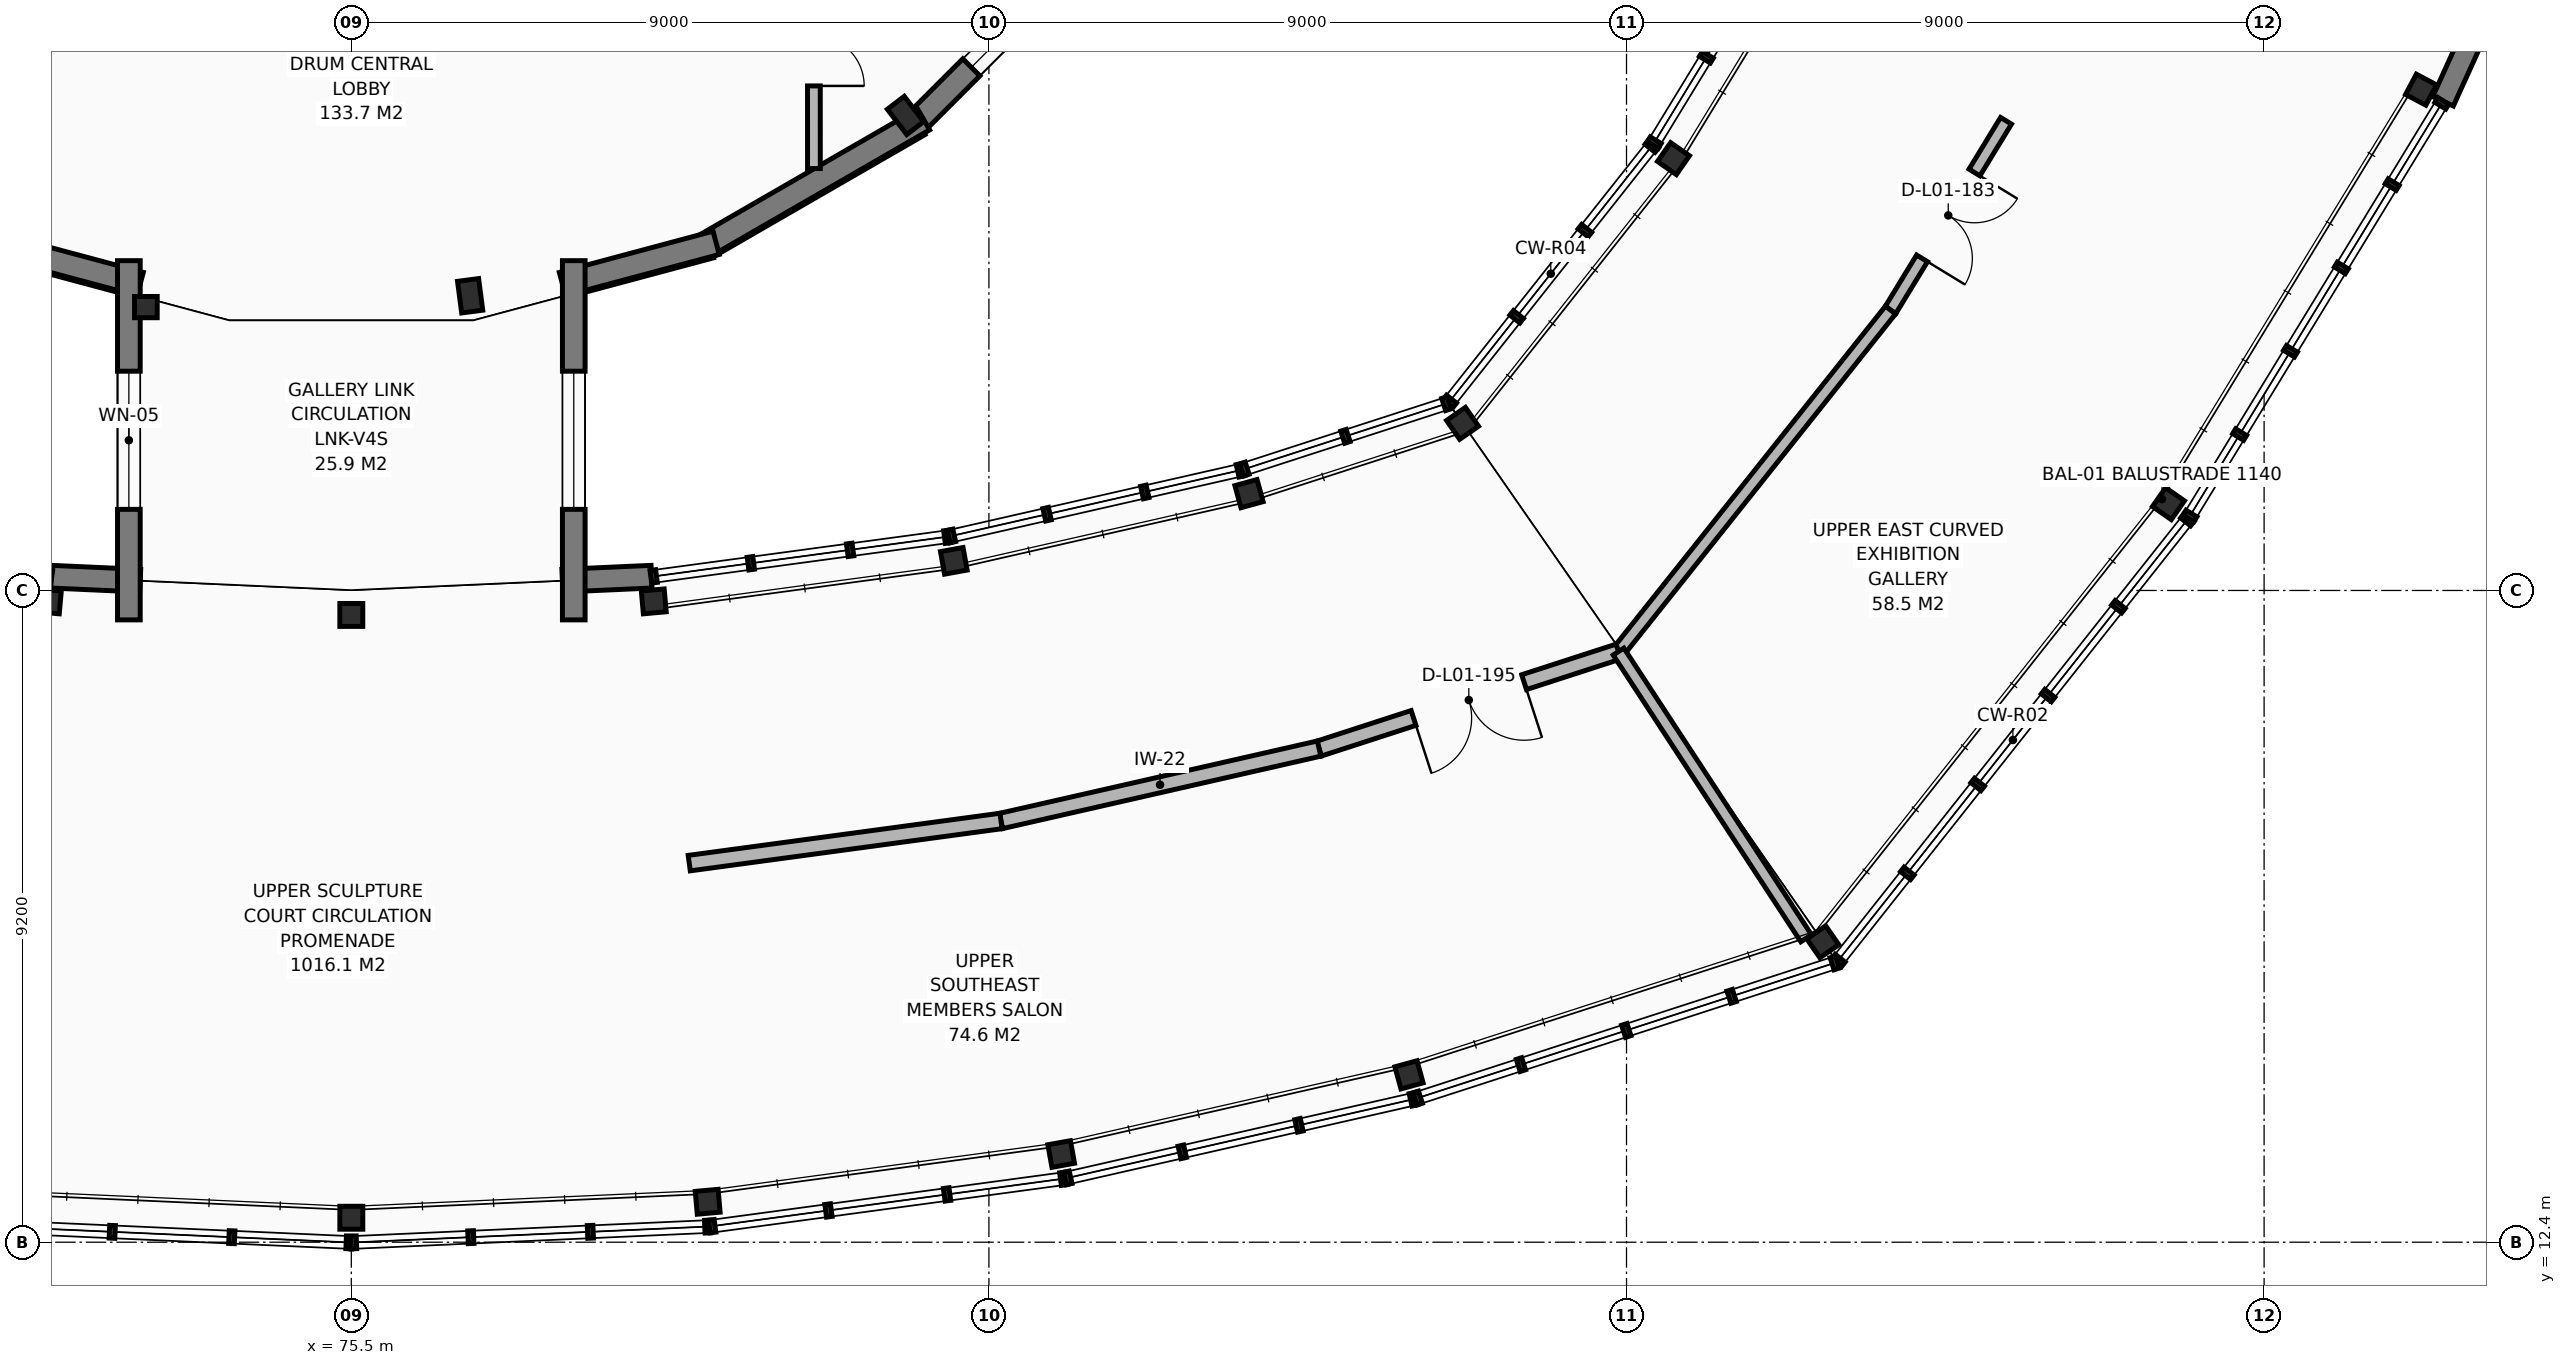
"""IFC4 building model, lengths in metres.
Left out: names, types, materials, properties, quantities, classifications, styles, units other than length and angle.
Written with IfcOpenShell. Run it as: python <this file> out.ifc"""

import sys

from ifc_helpers import new_model, si_unit, direction, frame, frame_2d, origin, origin_2d, place, context, subcontext, project, spatial, rectangle, hollow_circle, i_section, extrude, element, fill, save


model = new_model("IFC4")
c1 = context("Model", 3, precision=1e-05, world=origin(), true_north=direction((0.0, 1.0)))
c2 = subcontext(c1, "Body", "Model", "MODEL_VIEW")
j1 = project(units=[si_unit("LENGTHUNIT", "METRE"), si_unit("PLANEANGLEUNIT", "RADIAN")], contexts=[c1])
p1 = place(None, origin())
s1 = spatial("IfcSite", under=j1, at=p1, CompositionType="ELEMENT")
p2 = place(p1, origin())
s2 = spatial("IfcBuilding", under=s1, at=p2, CompositionType="ELEMENT")
p3 = place(p2, frame((0.0, 0.0, 5.1)))
s3 = spatial("IfcBuildingStorey", under=s2, at=p3, CompositionType="ELEMENT", Elevation=5.1)
for number, where, z_axis, x_axis in (
    (1, (96.271, 16.64, 0.0), (0.0, 0.0, 1.0), (-0.571, 0.821, 0.0)),
    (2, (91.186, 23.959, 0.0), (0.0, 0.0, 1.0), (-0.571, 0.821, 0.0)),
    (3, (101.15, 22.825, 0.0), (0.0, 0.0, 1.0), (-0.82, 0.572, 0.0)),
    (4, (94.163, 27.696, 0.0), (0.0, 0.0, 1.0), (-0.82, 0.572, 0.0)),
    (5, (104.716, 28.669, 0.0), (0.0, 0.0, 1.0), (-0.884, 0.468, 0.0)),
    (6, (71.231, 21.446, 0.0), (0.0, 0.0, 1.0), (0.089, 0.996, 0.0)),
    (7, (75.5, 12.745, 0.0), (0.0, 0.0, 1.0), (0.0, 1.0, 0.0)),
    (8, (75.5, 21.255, 0.0), (0.0, 0.0, 1.0), (0.0, 1.0, 0.0)),
    (9, (80.53, 12.971, 0.0), (0.0, 0.0, 1.0), (-0.089, 0.996, 0.0)),
    (10, (79.769, 21.446, 0.0), (0.0, 0.0, 1.0), (-0.089, 0.996, 0.0)),
    (11, (85.52, 13.645, 0.0), (0.0, 0.0, 1.0), (-0.178, 0.984, 0.0)),
    (12, (84.004, 22.018, 0.0), (0.0, 0.0, 1.0), (-0.178, 0.984, 0.0)),
    (13, (90.43, 14.763, 0.0), (0.0, 0.0, 1.0), (-0.265, 0.964, 0.0)),
    (14, (88.171, 22.967, 0.0), (0.0, 0.0, 1.0), (-0.265, 0.964, 0.0)),
):
    element("IfcColumn", number, at=place(p3, frame(where, z_axis=z_axis, x_axis=x_axis)), inside=s3, PredefinedType="COLUMN", context=c2, shape_type="SweptSolid", body=[
        extrude(hollow_circle(Radius=0.162, WallThickness=0.016, at=origin_2d()), origin(), (0.0, 0.0, 1.0), 4.42),
    ])
for number, where, z_axis, x_axis in (
    (15, (77.177, 25.76, 0.0), (0.0, 0.0, 1.0), (0.131, -0.991, 0.0)),
    (16, (83.323, 28.305, 0.0), (0.0, 0.0, 1.0), (0.609, -0.793, 0.0)),
):
    element("IfcColumn", number, at=place(p3, frame(where, z_axis=z_axis, x_axis=x_axis)), inside=s3, PredefinedType="COLUMN", context=c2, shape_type="SweptSolid", body=[
        extrude(i_section(OverallWidth=0.3, OverallDepth=0.45, WebThickness=0.014, FlangeThickness=0.026, FilletRadius=0.027, at=origin_2d()), origin(), (0.0, 0.0, 1.0), 4.42),
    ])
p4 = place(p3, frame((73.067, 29.42, 0.0), z_axis=(0.0, 0.0, 1.0), x_axis=(1.0, 0.0, 0.0)))
e17 = element("IfcColumn", 17, at=p4, inside=s3, PredefinedType="COLUMN", context=c2, shape_type="SweptSolid", body=[
    extrude(i_section(OverallWidth=0.3, OverallDepth=0.6, WebThickness=0.015, FlangeThickness=0.03, FilletRadius=0.027, at=origin_2d()), origin(), (0.0, 0.0, 1.0), 4.42),
])
p5 = place(p3, frame((72.6, 25.6, 0.0), z_axis=(0.0, 0.0, 1.0), x_axis=(1.0, 0.0, 0.0)))
e18 = element("IfcColumn", 18, at=p5, inside=s3, PredefinedType="COLUMN", context=c2, shape_type="SweptSolid", body=[
    extrude(i_section(OverallWidth=0.3, OverallDepth=0.32, WebThickness=0.011, FlangeThickness=0.021, FilletRadius=0.027, at=origin_2d()), origin(), (0.0, 0.0, 1.0), 4.42),
])
p6 = place(p3, frame((106.485, 31.72, 0.0), z_axis=(0.0, 0.0, 1.0), x_axis=(-0.413433018277, -0.910534534984, 0.0)))
e19 = element("IfcWall", 19, at=p6, inside=s3, PredefinedType="SOLIDWALL", context=c2, shape_type="SweptSolid", body=[
    extrude(rectangle(XDim=3.531, YDim=0.32, at=frame_2d((1.765, 0.0))), origin(), (0.0, 0.0, 1.0), 4.18),
])
for number, where, z_axis, x_axis in (
    (20, (71.262, 21.794, 0.0), (0.0, 0.0, 1.0), (0.999, -0.045, 0.0)),
    (21, (78.48, 21.738, 0.0), (0.0, 0.0, 1.0), (0.999, 0.045, 0.0)),
):
    element("IfcWall", number, at=place(p3, frame(where, z_axis=z_axis, x_axis=x_axis)), inside=s3, PredefinedType="SOLIDWALL", context=c2, shape_type="SweptSolid", body=[
        extrude(rectangle(XDim=1.259, YDim=0.32, at=frame_2d((0.63, 0.0))), origin(), (0.0, 0.0, 1.0), 4.18),
    ])
p7 = place(p3, frame((85.957, 30.689, 0.0), z_axis=(0.0, 0.0, 1.0), x_axis=(-0.707106781187, -0.707106781187, 0.0)))
e22 = element("IfcWall", 22, at=p7, inside=s3, PredefinedType="SOLIDWALL", context=c2, shape_type="SweptSolid", body=[
    extrude(rectangle(XDim=3.571, YDim=0.34, at=frame_2d((1.786, 0.0))), origin(), (0.0, 0.0, 1.0), 4.2),
])
p8 = place(p7, frame((1.161, 0.0, 0.85)))
e23 = element("IfcOpeningElement", 23, at=p8, cuts=e22, PredefinedType="OPENING", context=c2, shape_type="SweptSolid", body=[
    extrude(rectangle(XDim=1.25, YDim=1.7, at=frame_2d((0.625, 0.85))), frame((0.0, 0.18, 0.0), z_axis=(0.0, -1.0, 0.0), x_axis=(1.0, 0.0, 0.0)), (0.0, 0.0, 1.0), 0.36),
])
p9 = place(p3, frame((83.579, 28.249, 0.0), z_axis=(0.0, 0.0, 1.0), x_axis=(-0.866021650523, -0.500006500783, 0.0)))
e24 = element("IfcWall", 24, at=p9, inside=s3, PredefinedType="SOLIDWALL", context=c2, shape_type="SweptSolid", body=[
    extrude(rectangle(XDim=3.571, YDim=0.34, at=frame_2d((1.786, 0.0))), origin(), (0.0, 0.0, 1.0), 4.2),
])
p10 = place(p3, frame((80.65, 26.507, 0.0), z_axis=(0.0, 0.0, 1.0), x_axis=(-0.965940290582, -0.258765057592, 0.0)))
e25 = element("IfcWall", 25, at=p10, inside=s3, PredefinedType="SOLIDWALL", context=c2, shape_type="SweptSolid", body=[
    extrude(rectangle(XDim=2.246, YDim=0.34, at=frame_2d((1.123, 0.0))), origin(), (0.0, 0.0, 1.0), 4.2),
])
p11 = place(p3, frame((72.52, 25.926, 0.0), z_axis=(0.0, 0.0, 1.0), x_axis=(-0.965939655771, 0.258767427258, 0.0)))
e26 = element("IfcWall", 26, at=p11, inside=s3, PredefinedType="SOLIDWALL", context=c2, shape_type="SweptSolid", body=[
    extrude(rectangle(XDim=2.077, YDim=0.34, at=frame_2d((1.038, 0.0))), origin(), (0.0, 0.0, 1.0), 4.2),
])
p12 = place(p3, frame((72.36, 21.185, 0.0), z_axis=(0.0, 0.0, 1.0), x_axis=(0.0, 1.0, 0.0)))
e27 = element("IfcWall", 27, at=p12, inside=s3, PredefinedType="SOLIDWALL", context=c2, shape_type="SweptSolid", body=[
    extrude(rectangle(XDim=5.071, YDim=0.32, at=frame_2d((2.536, 0.0))), origin(), (0.0, 0.0, 1.0), 4.18),
])
p13 = place(p12, frame((1.561, 0.0, 1.12)))
e28 = element("IfcOpeningElement", 28, at=p13, cuts=e27, PredefinedType="OPENING", context=c2, shape_type="SweptSolid", body=[
    extrude(rectangle(XDim=1.95, YDim=1.5, at=frame_2d((0.975, 0.75))), frame((0.0, 0.17, 0.0), z_axis=(0.0, -1.0, 0.0), x_axis=(1.0, 0.0, 0.0)), (0.0, 0.0, 1.0), 0.34),
])
p14 = place(p3, frame((78.64, 26.256, 0.0), z_axis=(0.0, 0.0, 1.0), x_axis=(0.0, -1.0, 0.0)))
e29 = element("IfcWall", 29, at=p14, inside=s3, PredefinedType="SOLIDWALL", context=c2, shape_type="SweptSolid", body=[
    extrude(rectangle(XDim=5.071, YDim=0.32, at=frame_2d((2.536, 0.0))), origin(), (0.0, 0.0, 1.0), 4.18),
])
p15 = place(p14, frame((1.561, 0.0, 1.12)))
e30 = element("IfcOpeningElement", 30, at=p15, cuts=e29, PredefinedType="OPENING", context=c2, shape_type="SweptSolid", body=[
    extrude(rectangle(XDim=1.95, YDim=1.5, at=frame_2d((0.975, 0.75))), frame((0.0, 0.17, 0.0), z_axis=(0.0, -1.0, 0.0), x_axis=(1.0, 0.0, 0.0)), (0.0, 0.0, 1.0), 0.34),
])
p16 = place(p3, frame((98.857, 28.23, 0.0), z_axis=(0.0, 0.0, 1.0), x_axis=(-0.521030331716, -0.853538161673, 0.0)))
e31 = element("IfcWall", 31, at=p16, inside=s3, PredefinedType="PARTITIONING", context=c2, shape_type="SweptSolid", body=[
    extrude(rectangle(XDim=3.13, YDim=0.18, at=frame_2d((1.565, 0.0))), origin(), (0.0, 0.0, 1.0), 3.57),
])
p17 = place(p16, frame((0.855, 0.0, 0.0)))
e32 = element("IfcOpeningElement", 32, at=p17, cuts=e31, PredefinedType="OPENING", context=c2, shape_type="SweptSolid", body=[
    extrude(rectangle(XDim=1.42, YDim=2.18, at=frame_2d((0.71, 1.09))), frame((0.0, 0.1, 0.0), z_axis=(0.0, -1.0, 0.0), x_axis=(1.0, 0.0, 0.0)), (0.0, 0.0, 1.0), 0.2),
])
p18 = place(p3, frame((97.226, 25.558, 0.0), z_axis=(0.0, 0.0, 1.0), x_axis=(-0.622978411473, -0.782239029223, 0.0)))
e33 = element("IfcWall", 33, at=p18, inside=s3, PredefinedType="PARTITIONING", context=c2, shape_type="SweptSolid", body=[
    extrude(rectangle(XDim=6.163, YDim=0.18, at=frame_2d((3.081, 0.0))), origin(), (0.0, 0.0, 1.0), 3.57),
])
p19 = place(p3, frame((93.387, 20.738, 0.0), z_axis=(0.0, 0.0, 1.0), x_axis=(-0.951298623727, -0.30827086871, 0.0)))
e34 = element("IfcWall", 34, at=p19, inside=s3, PredefinedType="PARTITIONING", context=c2, shape_type="SweptSolid", body=[
    extrude(rectangle(XDim=4.443, YDim=0.22, at=frame_2d((2.221, 0.0))), origin(), (0.0, 0.0, 1.0), 3.57),
])
p20 = place(p19, frame((1.402, 0.0, 0.0)))
e35 = element("IfcOpeningElement", 35, at=p20, cuts=e34, PredefinedType="OPENING", context=c2, shape_type="SweptSolid", body=[
    extrude(rectangle(XDim=1.64, YDim=2.2, at=frame_2d((0.82, 1.1))), frame((0.0, 0.12, 0.0), z_axis=(0.0, -1.0, 0.0), x_axis=(1.0, 0.0, 0.0)), (0.0, 0.0, 1.0), 0.24),
])
p21 = place(p3, frame((89.161, 19.368, 0.0), z_axis=(0.0, 0.0, 1.0), x_axis=(-0.975049979992, -0.221985442131, 0.0)))
e36 = element("IfcWall", 36, at=p21, inside=s3, PredefinedType="PARTITIONING", context=c2, shape_type="SweptSolid", body=[
    extrude(rectangle(XDim=4.605, YDim=0.22, at=frame_2d((2.302, 0.0))), origin(), (0.0, 0.0, 1.0), 3.57),
])
p22 = place(p3, frame((84.671, 18.346, 0.0), z_axis=(0.0, 0.0, 1.0), x_axis=(-0.990991049974, -0.133928110831, 0.0)))
e37 = element("IfcWall", 37, at=p22, inside=s3, PredefinedType="PARTITIONING", context=c2, shape_type="SweptSolid", body=[
    extrude(rectangle(XDim=4.441, YDim=0.22, at=frame_2d((2.22, 0.0))), origin(), (0.0, 0.0, 1.0), 3.57),
])
p23 = place(p3, frame((82.029, 31.309, 0.0), z_axis=(0.0, 0.0, 1.0), x_axis=(0.000325266702, -0.999999947101, 0.0)))
e38 = element("IfcWall", 38, at=p23, inside=s3, PredefinedType="PARTITIONING", context=c2, shape_type="SweptSolid", body=[
    extrude(rectangle(XDim=3.753, YDim=0.18, at=frame_2d((1.876, 0.0))), origin(), (0.0, 0.0, 1.0), 3.74),
])
p24 = place(p23, frame((1.167, 0.0, 0.0)))
e39 = element("IfcOpeningElement", 39, at=p24, cuts=e38, PredefinedType="OPENING", context=c2, shape_type="SweptSolid", body=[
    extrude(rectangle(XDim=1.42, YDim=2.18, at=frame_2d((0.71, 1.09))), frame((0.0, 0.1, 0.0), z_axis=(0.0, -1.0, 0.0), x_axis=(1.0, 0.0, 0.0)), (0.0, 0.0, 1.0), 0.2),
])
p25 = place(p3, frame((96.036, 16.69, 0.0), z_axis=(0.0, 0.0, 1.0), x_axis=(-0.547563449624, 0.836764165483, 0.0)))
e40 = element("IfcWall", 40, at=p25, inside=s3, PredefinedType="PARTITIONING", context=c2, shape_type="SweptSolid", body=[
    extrude(rectangle(XDim=4.837, YDim=0.18, at=frame_2d((2.418, 0.0))), origin(), (0.0, 0.0, 1.0), 3.57),
])
p26 = place(p8, origin())
e41 = element("IfcWindow", 41, at=p26, inside=s3, PartitioningType="SINGLE_PANEL", PredefinedType="WINDOW", context=c2, shape_type="SweptSolid", body=[
    extrude(rectangle(XDim=1.25, YDim=1.7, at=frame_2d((0.625, 0.85))), frame((0.0, 0.03, 0.0), z_axis=(0.0, -1.0, 0.0), x_axis=(1.0, 0.0, 0.0)), (0.0, 0.0, 1.0), 0.06),
])
fill(e23, e41)
p27 = place(p13, origin())
e42 = element("IfcWindow", 42, at=p27, inside=s3, PartitioningType="SINGLE_PANEL", PredefinedType="WINDOW", context=c2, shape_type="SweptSolid", body=[
    extrude(rectangle(XDim=1.95, YDim=1.5, at=frame_2d((0.975, 0.75))), frame((0.0, 0.03, 0.0), z_axis=(0.0, -1.0, 0.0), x_axis=(1.0, 0.0, 0.0)), (0.0, 0.0, 1.0), 0.06),
])
fill(e28, e42)
p28 = place(p15, origin())
e43 = element("IfcWindow", 43, at=p28, inside=s3, PartitioningType="SINGLE_PANEL", PredefinedType="WINDOW", context=c2, shape_type="SweptSolid", body=[
    extrude(rectangle(XDim=1.95, YDim=1.5, at=frame_2d((0.975, 0.75))), frame((0.0, 0.03, 0.0), z_axis=(0.0, -1.0, 0.0), x_axis=(1.0, 0.0, 0.0)), (0.0, 0.0, 1.0), 0.06),
])
fill(e30, e43)
p29 = place(p17, origin())
e44 = element("IfcDoor", 44, at=p29, inside=s3, OperationType="DOUBLE_DOOR_SINGLE_SWING", PredefinedType="DOOR", context=c2, shape_type="SweptSolid", body=[
    extrude(rectangle(XDim=1.42, YDim=2.18, at=frame_2d((0.71, 1.09))), frame((0.0, 0.025, 0.0), z_axis=(0.0, -1.0, 0.0), x_axis=(1.0, 0.0, 0.0)), (0.0, 0.0, 1.0), 0.05),
])
fill(e32, e44)
p30 = place(p20, origin())
e45 = element("IfcDoor", 45, at=p30, inside=s3, OperationType="DOUBLE_DOOR_SINGLE_SWING", PredefinedType="DOOR", context=c2, shape_type="SweptSolid", body=[
    extrude(rectangle(XDim=1.64, YDim=2.2, at=frame_2d((0.82, 1.1))), frame((0.0, 0.025, 0.0), z_axis=(0.0, -1.0, 0.0), x_axis=(1.0, 0.0, 0.0)), (0.0, 0.0, 1.0), 0.05),
])
fill(e35, e45)
p31 = place(p24, origin())
e46 = element("IfcDoor", 46, at=p31, inside=s3, OperationType="DOUBLE_DOOR_SINGLE_SWING", PredefinedType="DOOR", context=c2, shape_type="SweptSolid", body=[
    extrude(rectangle(XDim=1.42, YDim=2.18, at=frame_2d((0.71, 1.09))), frame((0.0, 0.025, 0.0), z_axis=(0.0, -1.0, 0.0), x_axis=(1.0, 0.0, 0.0)), (0.0, 0.0, 1.0), 0.05),
])
fill(e39, e46)
save(model, sys.argv[1])
